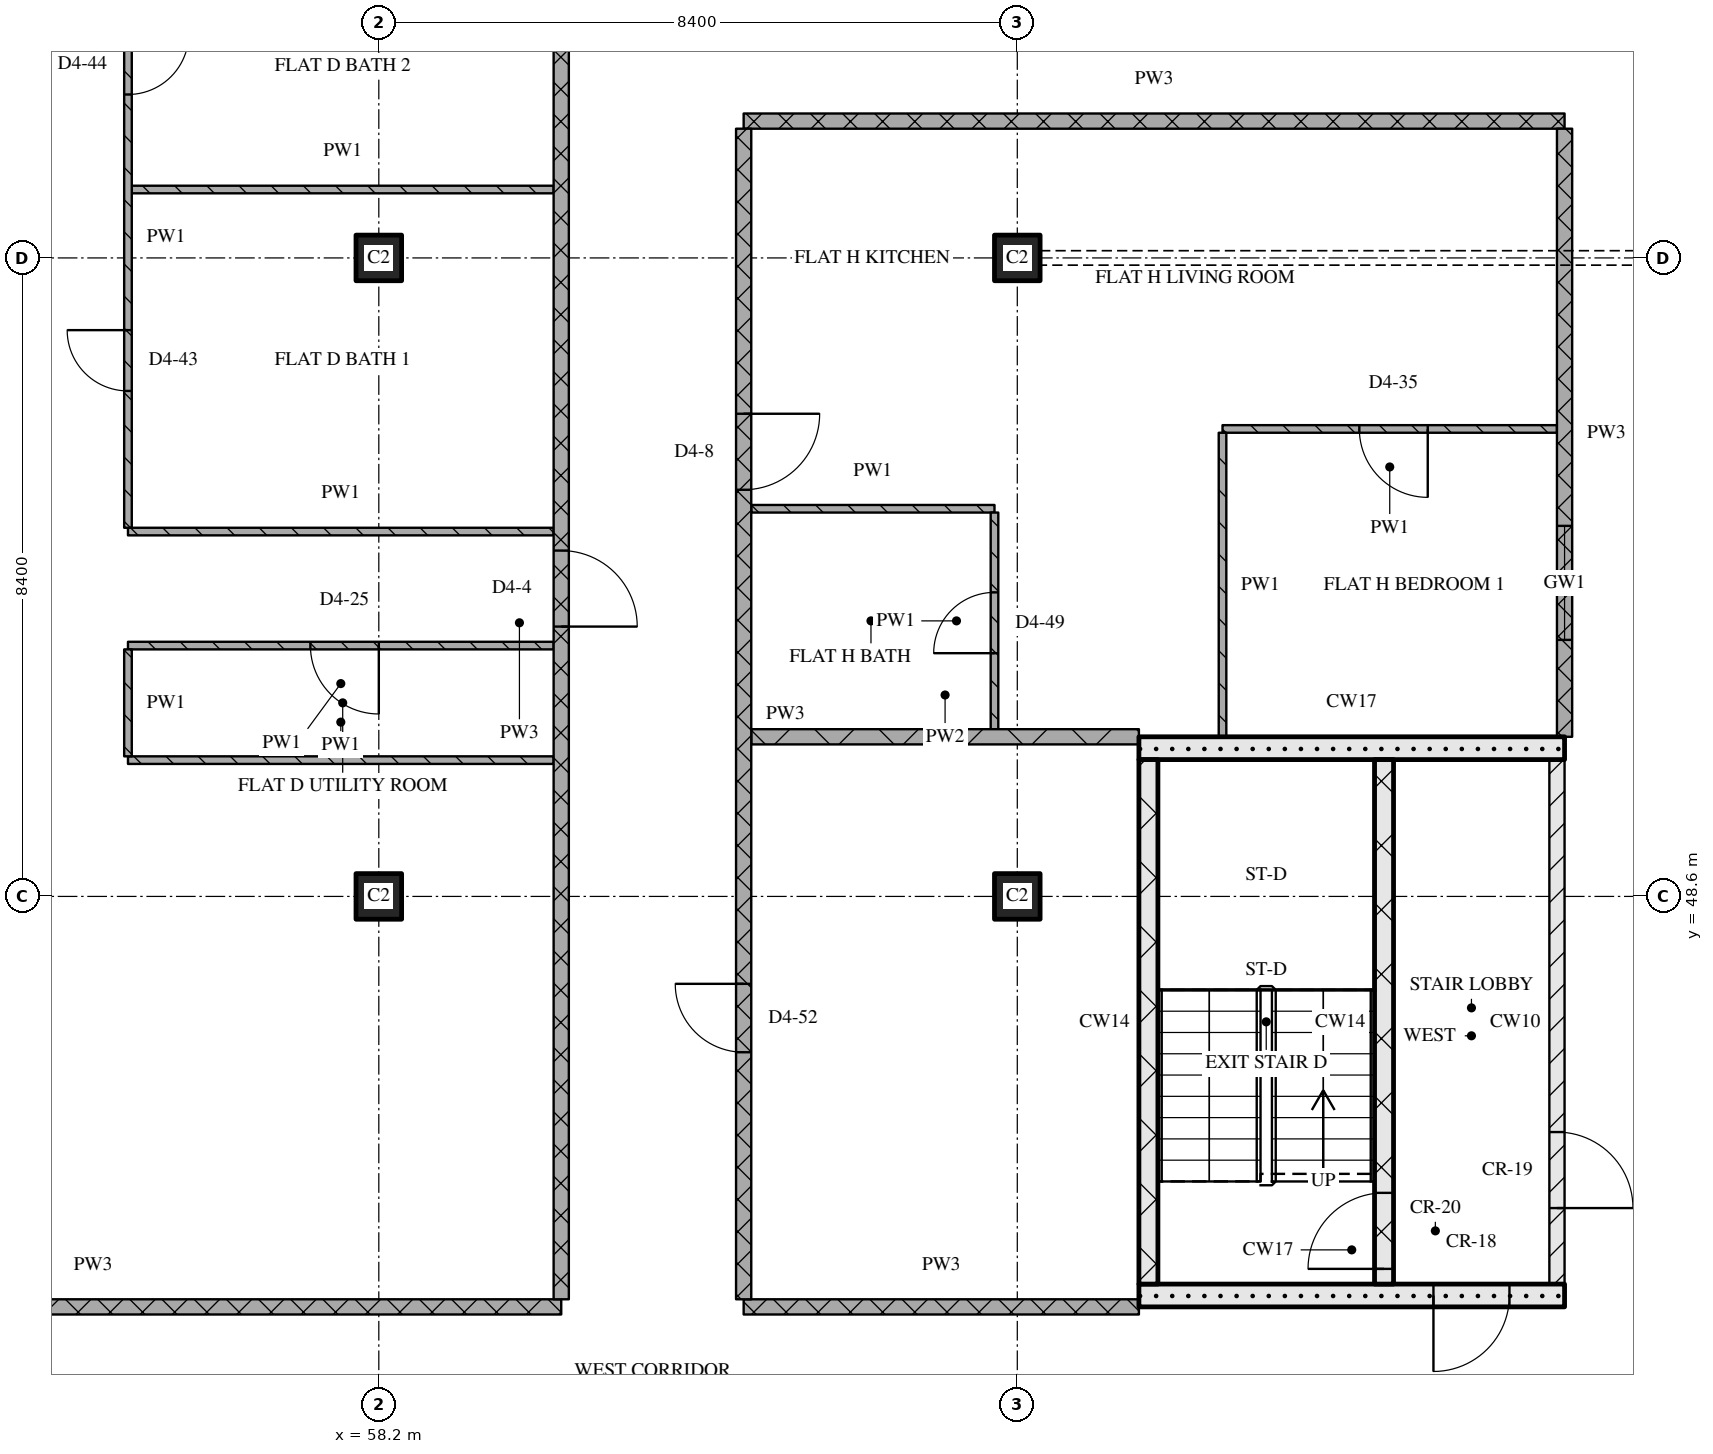
"""IFC4 building model, lengths in metres.
Left out: names, types, materials, properties, quantities, classifications, styles, units other than length and angle.
Written with IfcOpenShell. Run it as: python <this file> out.ifc"""

import sys

from ifc_helpers import new_model, si_unit, direction, frame, frame_2d, origin, origin_2d, place, context, subcontext, project, spatial, rectangle, extrude, element, fill, save


model = new_model("IFC4")
c1 = context("Model", 3, precision=1e-05, world=origin(), true_north=direction((0.0, 1.0)))
c2 = subcontext(c1, "Body", "Model", "MODEL_VIEW")
j1 = project(units=[si_unit("LENGTHUNIT", "METRE"), si_unit("PLANEANGLEUNIT", "RADIAN")], contexts=[c1])
p1 = place(None, origin())
s1 = spatial("IfcSite", under=j1, at=p1, CompositionType="ELEMENT")
p2 = place(p1, origin())
s2 = spatial("IfcBuilding", under=s1, at=p2, CompositionType="ELEMENT")
p3 = place(p2, frame((0.0, 0.0, 245.1)))
s3 = spatial("IfcBuildingStorey", under=s2, at=p3, CompositionType="ELEMENT", Elevation=245.1)
for number, where, z_axis, x_axis in (
    (1, (58.2, 48.6, 0.0), (0.0, 0.0, 1.0), (1.0, 0.0, 0.0)),
    (2, (58.2, 57.0, 0.0), (0.0, 0.0, 1.0), (1.0, 0.0, 0.0)),
    (3, (66.6, 48.6, 0.0), (0.0, 0.0, 1.0), (1.0, 0.0, 0.0)),
    (4, (66.6, 57.0, 0.0), (0.0, 0.0, 1.0), (1.0, 0.0, 0.0)),
):
    element("IfcColumn", number, at=place(p3, frame(where, z_axis=z_axis, x_axis=x_axis)), inside=s3, PredefinedType="COLUMN", context=c2, shape_type="SweptSolid", body=[
        extrude(rectangle(XDim=0.6, YDim=0.6, at=origin_2d()), origin(), (0.0, 0.0, 1.0), 3.6),
    ])
p4 = place(p3, frame((68.2, 43.35, 0.0), z_axis=(0.0, 0.0, 1.0), x_axis=(1.0, 0.0, 0.0)))
e5 = element("IfcWall", 5, at=p4, inside=s3, PredefinedType="SOLIDWALL", context=c2, shape_type="SweptSolid", body=[
    extrude(rectangle(XDim=5.6, YDim=0.3, at=frame_2d((2.8, 0.0))), origin(), (0.0, 0.0, 1.0), 3.32),
])
p5 = place(p4, frame((3.875, 0.0, 0.0)))
e6 = element("IfcOpeningElement", 6, at=p5, cuts=e5, PredefinedType="OPENING", context=c2, shape_type="SweptSolid", body=[
    extrude(rectangle(XDim=1.0, YDim=2.1, at=frame_2d((0.5, 1.05))), frame((0.0, 0.16, 0.0), z_axis=(0.0, -1.0, 0.0), x_axis=(1.0, 0.0, 0.0)), (0.0, 0.0, 1.0), 0.32),
])
p6 = place(p3, frame((68.325, 43.5, 0.0), z_axis=(0.0, 0.0, 1.0), x_axis=(0.0, 1.0, 0.0)))
e7 = element("IfcWall", 7, at=p6, inside=s3, PredefinedType="SOLIDWALL", context=c2, shape_type="SweptSolid", body=[
    extrude(rectangle(XDim=6.9, YDim=0.25, at=frame_2d((3.45, 0.0))), origin(), (0.0, 0.0, 1.0), 3.32),
])
p7 = place(p3, frame((71.425, 43.5, 0.0), z_axis=(0.0, 0.0, 1.0), x_axis=(0.0, 1.0, 0.0)))
e8 = element("IfcWall", 8, at=p7, inside=s3, PredefinedType="SOLIDWALL", context=c2, shape_type="SweptSolid", body=[
    extrude(rectangle(XDim=6.9, YDim=0.25, at=frame_2d((3.45, 0.0))), origin(), (0.0, 0.0, 1.0), 3.32),
])
p8 = place(p7, frame((0.2, 0.0, 0.0)))
e9 = element("IfcOpeningElement", 9, at=p8, cuts=e8, PredefinedType="OPENING", context=c2, shape_type="SweptSolid", body=[
    extrude(rectangle(XDim=1.0, YDim=2.1, at=frame_2d((0.5, 1.05))), frame((0.0, 0.135, 0.0), z_axis=(0.0, -1.0, 0.0), x_axis=(1.0, 0.0, 0.0)), (0.0, 0.0, 1.0), 0.27),
])
p9 = place(p3, frame((73.7, 43.5, 0.0), z_axis=(0.0, 0.0, 1.0), x_axis=(0.0, 1.0, 0.0)))
e10 = element("IfcWall", 10, at=p9, inside=s3, PredefinedType="PARTITIONING", context=c2, shape_type="SweptSolid", body=[
    extrude(rectangle(XDim=6.9, YDim=0.2, at=frame_2d((3.45, 0.0))), origin(), (0.0, 0.0, 1.0), 3.32),
])
p10 = place(p9, frame((1.0, 0.0, 0.0)))
e11 = element("IfcOpeningElement", 11, at=p10, cuts=e10, PredefinedType="OPENING", context=c2, shape_type="SweptSolid", body=[
    extrude(rectangle(XDim=1.0, YDim=2.1, at=frame_2d((0.5, 1.05))), frame((0.0, 0.11, 0.0), z_axis=(0.0, -1.0, 0.0), x_axis=(1.0, 0.0, 0.0)), (0.0, 0.0, 1.0), 0.22),
])
p11 = place(p3, frame((68.2, 50.55, 0.0), z_axis=(0.0, 0.0, 1.0), x_axis=(1.0, 0.0, 0.0)))
e12 = element("IfcWall", 12, at=p11, inside=s3, PredefinedType="SOLIDWALL", context=c2, shape_type="SweptSolid", body=[
    extrude(rectangle(XDim=5.6, YDim=0.3, at=frame_2d((2.8, 0.0))), origin(), (0.0, 0.0, 1.0), 3.32),
])
p12 = place(p3, frame((48.28, 43.2, 0.0), z_axis=(0.0, 0.0, 1.0), x_axis=(1.0, 0.0, 0.0)))
e13 = element("IfcWall", 13, at=p12, inside=s3, PredefinedType="PARTITIONING", context=c2, shape_type="SweptSolid", body=[
    extrude(rectangle(XDim=12.32, YDim=0.2, at=frame_2d((6.16, 0.0))), origin(), (0.0, 0.0, 1.0), 3.32),
])
p13 = place(p3, frame((63.0, 43.2, 0.0), z_axis=(0.0, 0.0, 1.0), x_axis=(1.0, 0.0, 0.0)))
e14 = element("IfcWall", 14, at=p13, inside=s3, PredefinedType="PARTITIONING", context=c2, shape_type="SweptSolid", body=[
    extrude(rectangle(XDim=5.2, YDim=0.2, at=frame_2d((2.6, 0.0))), origin(), (0.0, 0.0, 1.0), 3.32),
])
p14 = place(p3, frame((54.9, 50.393, 0.0), z_axis=(0.0, 0.0, 1.0), x_axis=(1.0, 0.0, 0.0)))
e15 = element("IfcWall", 15, at=p14, inside=s3, PredefinedType="PARTITIONING", context=c2, shape_type="SweptSolid", body=[
    extrude(rectangle(XDim=5.6, YDim=0.1, at=frame_2d((2.8, 0.0))), origin(), (0.0, 0.0, 1.0), 3.32),
])
p15 = place(p3, frame((63.1, 50.7, 0.0), z_axis=(0.0, 0.0, 1.0), x_axis=(1.0, 0.0, 0.0)))
e16 = element("IfcWall", 16, at=p15, inside=s3, PredefinedType="PARTITIONING", context=c2, shape_type="SweptSolid", body=[
    extrude(rectangle(XDim=5.1, YDim=0.2, at=frame_2d((2.55, 0.0))), origin(), (0.0, 0.0, 1.0), 3.32),
])
p16 = place(p3, frame((60.5, 51.9, 0.0), z_axis=(0.0, 0.0, 1.0), x_axis=(-1.0, 0.0, 0.0)))
e17 = element("IfcWall", 17, at=p16, inside=s3, PredefinedType="PARTITIONING", context=c2, shape_type="SweptSolid", body=[
    extrude(rectangle(XDim=5.6, YDim=0.1, at=frame_2d((2.8, 0.0))), origin(), (0.0, 0.0, 1.0), 3.32),
])
p17 = place(p16, frame((2.3, 0.0, 0.0)))
e18 = element("IfcOpeningElement", 18, at=p17, cuts=e17, PredefinedType="OPENING", context=c2, shape_type="SweptSolid", body=[
    extrude(rectangle(XDim=0.9, YDim=2.1, at=frame_2d((0.45, 1.05))), frame((0.0, 0.06, 0.0), z_axis=(0.0, -1.0, 0.0), x_axis=(1.0, 0.0, 0.0)), (0.0, 0.0, 1.0), 0.12),
])
p18 = place(p3, frame((54.9, 53.4, 0.0), z_axis=(0.0, 0.0, 1.0), x_axis=(1.0, 0.0, 0.0)))
e19 = element("IfcWall", 19, at=p18, inside=s3, PredefinedType="PARTITIONING", context=c2, shape_type="SweptSolid", body=[
    extrude(rectangle(XDim=5.6, YDim=0.1, at=frame_2d((2.8, 0.0))), origin(), (0.0, 0.0, 1.0), 3.32),
])
p19 = place(p3, frame((63.1, 53.7, 0.0), z_axis=(0.0, 0.0, 1.0), x_axis=(1.0, 0.0, 0.0)))
e20 = element("IfcWall", 20, at=p19, inside=s3, PredefinedType="PARTITIONING", context=c2, shape_type="SweptSolid", body=[
    extrude(rectangle(XDim=3.2, YDim=0.1, at=frame_2d((1.6, 0.0))), origin(), (0.0, 0.0, 1.0), 3.32),
])
p20 = place(p3, frame((73.7, 54.75, 0.0), z_axis=(0.0, 0.0, 1.0), x_axis=(-1.0, 0.0, 0.0)))
e21 = element("IfcWall", 21, at=p20, inside=s3, PredefinedType="PARTITIONING", context=c2, shape_type="SweptSolid", body=[
    extrude(rectangle(XDim=4.4, YDim=0.1, at=frame_2d((2.2, 0.0))), origin(), (0.0, 0.0, 1.0), 3.32),
])
p21 = place(p20, frame((1.7, 0.0, 0.0)))
e22 = element("IfcOpeningElement", 22, at=p21, cuts=e21, PredefinedType="OPENING", context=c2, shape_type="SweptSolid", body=[
    extrude(rectangle(XDim=0.9, YDim=2.1, at=frame_2d((0.45, 1.05))), frame((0.0, 0.06, 0.0), z_axis=(0.0, -1.0, 0.0), x_axis=(1.0, 0.0, 0.0)), (0.0, 0.0, 1.0), 0.12),
])
p22 = place(p3, frame((54.95, 57.9, 0.0), z_axis=(0.0, 0.0, 1.0), x_axis=(1.0, 0.0, 0.0)))
e23 = element("IfcWall", 23, at=p22, inside=s3, PredefinedType="PARTITIONING", context=c2, shape_type="SweptSolid", body=[
    extrude(rectangle(XDim=5.55, YDim=0.1, at=frame_2d((2.775, 0.0))), origin(), (0.0, 0.0, 1.0), 3.32),
])
p23 = place(p3, frame((63.0, 58.8, 0.0), z_axis=(0.0, 0.0, 1.0), x_axis=(1.0, 0.0, 0.0)))
e24 = element("IfcWall", 24, at=p23, inside=s3, PredefinedType="PARTITIONING", context=c2, shape_type="SweptSolid", body=[
    extrude(rectangle(XDim=10.8, YDim=0.2, at=frame_2d((5.4, 0.0))), origin(), (0.0, 0.0, 1.0), 3.32),
])
p24 = place(p3, frame((54.9, 51.85, 0.0), z_axis=(0.0, 0.0, 1.0), x_axis=(0.0, -1.0, 0.0)))
e25 = element("IfcWall", 25, at=p24, inside=s3, PredefinedType="PARTITIONING", context=c2, shape_type="SweptSolid", body=[
    extrude(rectangle(XDim=1.407, YDim=0.1, at=frame_2d((0.704, 0.0))), origin(), (0.0, 0.0, 1.0), 3.32),
])
p25 = place(p3, frame((54.9, 61.1, 0.0), z_axis=(0.0, 0.0, 1.0), x_axis=(0.0, -1.0, 0.0)))
e26 = element("IfcWall", 26, at=p25, inside=s3, PredefinedType="PARTITIONING", context=c2, shape_type="SweptSolid", body=[
    extrude(rectangle(XDim=7.65, YDim=0.1, at=frame_2d((3.825, 0.0))), origin(), (0.0, 0.0, 1.0), 3.32),
])
p26 = place(p25, frame((1.15, 0.0, 0.0)))
e27 = element("IfcOpeningElement", 27, at=p26, cuts=e26, PredefinedType="OPENING", context=c2, shape_type="SweptSolid", body=[
    extrude(rectangle(XDim=0.8, YDim=2.1, at=frame_2d((0.4, 1.05))), frame((0.0, 0.06, 0.0), z_axis=(0.0, -1.0, 0.0), x_axis=(1.0, 0.0, 0.0)), (0.0, 0.0, 1.0), 0.12),
])
p27 = place(p25, frame((5.05, 0.0, 0.0)))
e28 = element("IfcOpeningElement", 28, at=p27, cuts=e26, PredefinedType="OPENING", context=c2, shape_type="SweptSolid", body=[
    extrude(rectangle(XDim=0.8, YDim=2.1, at=frame_2d((0.4, 1.05))), frame((0.0, 0.06, 0.0), z_axis=(0.0, -1.0, 0.0), x_axis=(1.0, 0.0, 0.0)), (0.0, 0.0, 1.0), 0.12),
])
p28 = place(p3, frame((60.6, 43.3, 0.0), z_axis=(0.0, 0.0, 1.0), x_axis=(0.0, 1.0, 0.0)))
e29 = element("IfcWall", 29, at=p28, inside=s3, PredefinedType="PARTITIONING", context=c2, shape_type="SweptSolid", body=[
    extrude(rectangle(XDim=17.8, YDim=0.2, at=frame_2d((8.9, 0.0))), origin(), (0.0, 0.0, 1.0), 3.32),
])
p29 = place(p28, frame((8.85, 0.0, 0.0)))
e30 = element("IfcOpeningElement", 30, at=p29, cuts=e29, PredefinedType="OPENING", context=c2, shape_type="SweptSolid", body=[
    extrude(rectangle(XDim=1.0, YDim=2.1, at=frame_2d((0.5, 1.05))), frame((0.0, 0.11, 0.0), z_axis=(0.0, -1.0, 0.0), x_axis=(1.0, 0.0, 0.0)), (0.0, 0.0, 1.0), 0.22),
])
p30 = place(p3, frame((63.0, 58.7, 0.0), z_axis=(0.0, 0.0, 1.0), x_axis=(0.0, -1.0, 0.0)))
e31 = element("IfcWall", 31, at=p30, inside=s3, PredefinedType="PARTITIONING", context=c2, shape_type="SweptSolid", body=[
    extrude(rectangle(XDim=15.4, YDim=0.2, at=frame_2d((7.7, 0.0))), origin(), (0.0, 0.0, 1.0), 3.32),
])
p31 = place(p30, frame((3.75, 0.0, 0.0)))
e32 = element("IfcOpeningElement", 32, at=p31, cuts=e31, PredefinedType="OPENING", context=c2, shape_type="SweptSolid", body=[
    extrude(rectangle(XDim=1.0, YDim=2.1, at=frame_2d((0.5, 1.05))), frame((0.0, 0.11, 0.0), z_axis=(0.0, -1.0, 0.0), x_axis=(1.0, 0.0, 0.0)), (0.0, 0.0, 1.0), 0.22),
])
p32 = place(p30, frame((11.25, 0.0, 0.0)))
e33 = element("IfcOpeningElement", 33, at=p32, cuts=e31, PredefinedType="OPENING", context=c2, shape_type="SweptSolid", body=[
    extrude(rectangle(XDim=0.9, YDim=2.1, at=frame_2d((0.45, 1.05))), frame((0.0, 0.11, 0.0), z_axis=(0.0, -1.0, 0.0), x_axis=(1.0, 0.0, 0.0)), (0.0, 0.0, 1.0), 0.22),
])
p33 = place(p3, frame((66.3, 50.8, 0.0), z_axis=(0.0, 0.0, 1.0), x_axis=(0.0, 1.0, 0.0)))
e34 = element("IfcWall", 34, at=p33, inside=s3, PredefinedType="PARTITIONING", context=c2, shape_type="SweptSolid", body=[
    extrude(rectangle(XDim=2.85, YDim=0.1, at=frame_2d((1.425, 0.0))), origin(), (0.0, 0.0, 1.0), 3.32),
])
p34 = place(p33, frame((1.0, 0.0, 0.0)))
e35 = element("IfcOpeningElement", 35, at=p34, cuts=e34, PredefinedType="OPENING", context=c2, shape_type="SweptSolid", body=[
    extrude(rectangle(XDim=0.8, YDim=2.1, at=frame_2d((0.4, 1.05))), frame((0.0, 0.06, 0.0), z_axis=(0.0, -1.0, 0.0), x_axis=(1.0, 0.0, 0.0)), (0.0, 0.0, 1.0), 0.12),
])
p35 = place(p3, frame((69.3, 54.7, 0.0), z_axis=(0.0, 0.0, 1.0), x_axis=(0.0, -1.0, 0.0)))
e36 = element("IfcWall", 36, at=p35, inside=s3, PredefinedType="PARTITIONING", context=c2, shape_type="SweptSolid", body=[
    extrude(rectangle(XDim=4.0, YDim=0.1, at=frame_2d((2.0, 0.0))), origin(), (0.0, 0.0, 1.0), 3.32),
])
p36 = place(p3, frame((73.8, 58.7, 0.0), z_axis=(0.0, 0.0, 1.0), x_axis=(0.0, -1.0, 0.0)))
e37 = element("IfcWall", 37, at=p36, inside=s3, PredefinedType="PARTITIONING", context=c2, shape_type="SweptSolid", body=[
    extrude(rectangle(XDim=8.0, YDim=0.2, at=frame_2d((4.0, 0.0))), origin(), (0.0, 0.0, 1.0), 3.32),
])
p37 = place(p36, frame((5.225, 0.0, 0.9)))
e38 = element("IfcOpeningElement", 38, at=p37, cuts=e37, PredefinedType="OPENING", context=c2, shape_type="SweptSolid", body=[
    extrude(rectangle(XDim=1.5, YDim=1.5, at=frame_2d((0.75, 0.75))), frame((0.0, 0.11, 0.0), z_axis=(0.0, -1.0, 0.0), x_axis=(1.0, 0.0, 0.0)), (0.0, 0.0, 1.0), 0.22),
])
p38 = place(p5, origin())
e39 = element("IfcDoor", 39, at=p38, inside=s3, OperationType="SINGLE_SWING_RIGHT", PredefinedType="DOOR", context=c2, shape_type="SweptSolid", body=[
    extrude(rectangle(XDim=1.0, YDim=2.1, at=frame_2d((0.5, 1.05))), frame((0.0, 0.025, 0.0), z_axis=(0.0, -1.0, 0.0), x_axis=(1.0, 0.0, 0.0)), (0.0, 0.0, 1.0), 0.05),
])
fill(e6, e39)
p39 = place(p8, origin())
e40 = element("IfcDoor", 40, at=p39, inside=s3, OperationType="SINGLE_SWING_LEFT", PredefinedType="DOOR", context=c2, shape_type="SweptSolid", body=[
    extrude(rectangle(XDim=1.0, YDim=2.1, at=frame_2d((0.5, 1.05))), frame((0.0, 0.025, 0.0), z_axis=(0.0, -1.0, 0.0), x_axis=(1.0, 0.0, 0.0)), (0.0, 0.0, 1.0), 0.05),
])
fill(e9, e40)
p40 = place(p10, origin())
e41 = element("IfcDoor", 41, at=p40, inside=s3, OperationType="SINGLE_SWING_RIGHT", PredefinedType="DOOR", context=c2, shape_type="SweptSolid", body=[
    extrude(rectangle(XDim=1.0, YDim=2.1, at=frame_2d((0.5, 1.05))), frame((0.0, 0.025, 0.0), z_axis=(0.0, -1.0, 0.0), x_axis=(1.0, 0.0, 0.0)), (0.0, 0.0, 1.0), 0.05),
])
fill(e11, e41)
p41 = place(p17, origin())
e42 = element("IfcDoor", 42, at=p41, inside=s3, OperationType="SINGLE_SWING_LEFT", PredefinedType="DOOR", context=c2, shape_type="SweptSolid", body=[
    extrude(rectangle(XDim=0.9, YDim=2.1, at=frame_2d((0.45, 1.05))), frame((0.0, 0.025, 0.0), z_axis=(0.0, -1.0, 0.0), x_axis=(1.0, 0.0, 0.0)), (0.0, 0.0, 1.0), 0.05),
])
fill(e18, e42)
p42 = place(p21, origin())
e43 = element("IfcDoor", 43, at=p42, inside=s3, OperationType="SINGLE_SWING_LEFT", PredefinedType="DOOR", context=c2, shape_type="SweptSolid", body=[
    extrude(rectangle(XDim=0.9, YDim=2.1, at=frame_2d((0.45, 1.05))), frame((0.0, 0.025, 0.0), z_axis=(0.0, -1.0, 0.0), x_axis=(1.0, 0.0, 0.0)), (0.0, 0.0, 1.0), 0.05),
])
fill(e22, e43)
p43 = place(p26, origin())
e44 = element("IfcDoor", 44, at=p43, inside=s3, OperationType="SINGLE_SWING_LEFT", PredefinedType="DOOR", context=c2, shape_type="SweptSolid", body=[
    extrude(rectangle(XDim=0.8, YDim=2.1, at=frame_2d((0.4, 1.05))), frame((0.0, 0.025, 0.0), z_axis=(0.0, -1.0, 0.0), x_axis=(1.0, 0.0, 0.0)), (0.0, 0.0, 1.0), 0.05),
])
fill(e27, e44)
p44 = place(p27, origin())
e45 = element("IfcDoor", 45, at=p44, inside=s3, OperationType="SINGLE_SWING_RIGHT", PredefinedType="DOOR", context=c2, shape_type="SweptSolid", body=[
    extrude(rectangle(XDim=0.8, YDim=2.1, at=frame_2d((0.4, 1.05))), frame((0.0, 0.025, 0.0), z_axis=(0.0, -1.0, 0.0), x_axis=(1.0, 0.0, 0.0)), (0.0, 0.0, 1.0), 0.05),
])
fill(e28, e45)
p45 = place(p29, origin())
e46 = element("IfcDoor", 46, at=p45, inside=s3, OperationType="SINGLE_SWING_RIGHT", PredefinedType="DOOR", context=c2, shape_type="SweptSolid", body=[
    extrude(rectangle(XDim=1.0, YDim=2.1, at=frame_2d((0.5, 1.05))), frame((0.0, 0.025, 0.0), z_axis=(0.0, -1.0, 0.0), x_axis=(1.0, 0.0, 0.0)), (0.0, 0.0, 1.0), 0.05),
])
fill(e30, e46)
p46 = place(p31, origin())
e47 = element("IfcDoor", 47, at=p46, inside=s3, OperationType="SINGLE_SWING_LEFT", PredefinedType="DOOR", context=c2, shape_type="SweptSolid", body=[
    extrude(rectangle(XDim=1.0, YDim=2.1, at=frame_2d((0.5, 1.05))), frame((0.0, 0.025, 0.0), z_axis=(0.0, -1.0, 0.0), x_axis=(1.0, 0.0, 0.0)), (0.0, 0.0, 1.0), 0.05),
])
fill(e32, e47)
p47 = place(p32, origin())
e48 = element("IfcDoor", 48, at=p47, inside=s3, OperationType="SINGLE_SWING_RIGHT", PredefinedType="DOOR", context=c2, shape_type="SweptSolid", body=[
    extrude(rectangle(XDim=0.9, YDim=2.1, at=frame_2d((0.45, 1.05))), frame((0.0, 0.025, 0.0), z_axis=(0.0, -1.0, 0.0), x_axis=(1.0, 0.0, 0.0)), (0.0, 0.0, 1.0), 0.05),
])
fill(e33, e48)
p48 = place(p34, origin())
e49 = element("IfcDoor", 49, at=p48, inside=s3, OperationType="SINGLE_SWING_LEFT", PredefinedType="DOOR", context=c2, shape_type="SweptSolid", body=[
    extrude(rectangle(XDim=0.8, YDim=2.1, at=frame_2d((0.4, 1.05))), frame((0.0, 0.025, 0.0), z_axis=(0.0, -1.0, 0.0), x_axis=(1.0, 0.0, 0.0)), (0.0, 0.0, 1.0), 0.05),
])
fill(e35, e49)
p49 = place(p37, origin())
e50 = element("IfcWindow", 50, at=p49, inside=s3, PartitioningType="SINGLE_PANEL", PredefinedType="WINDOW", context=c2, shape_type="SweptSolid", body=[
    extrude(rectangle(XDim=1.5, YDim=1.5, at=frame_2d((0.75, 0.75))), frame((0.0, 0.03, 0.0), z_axis=(0.0, -1.0, 0.0), x_axis=(1.0, 0.0, 0.0)), (0.0, 0.0, 1.0), 0.06),
])
fill(e38, e50)
save(model, sys.argv[1])
